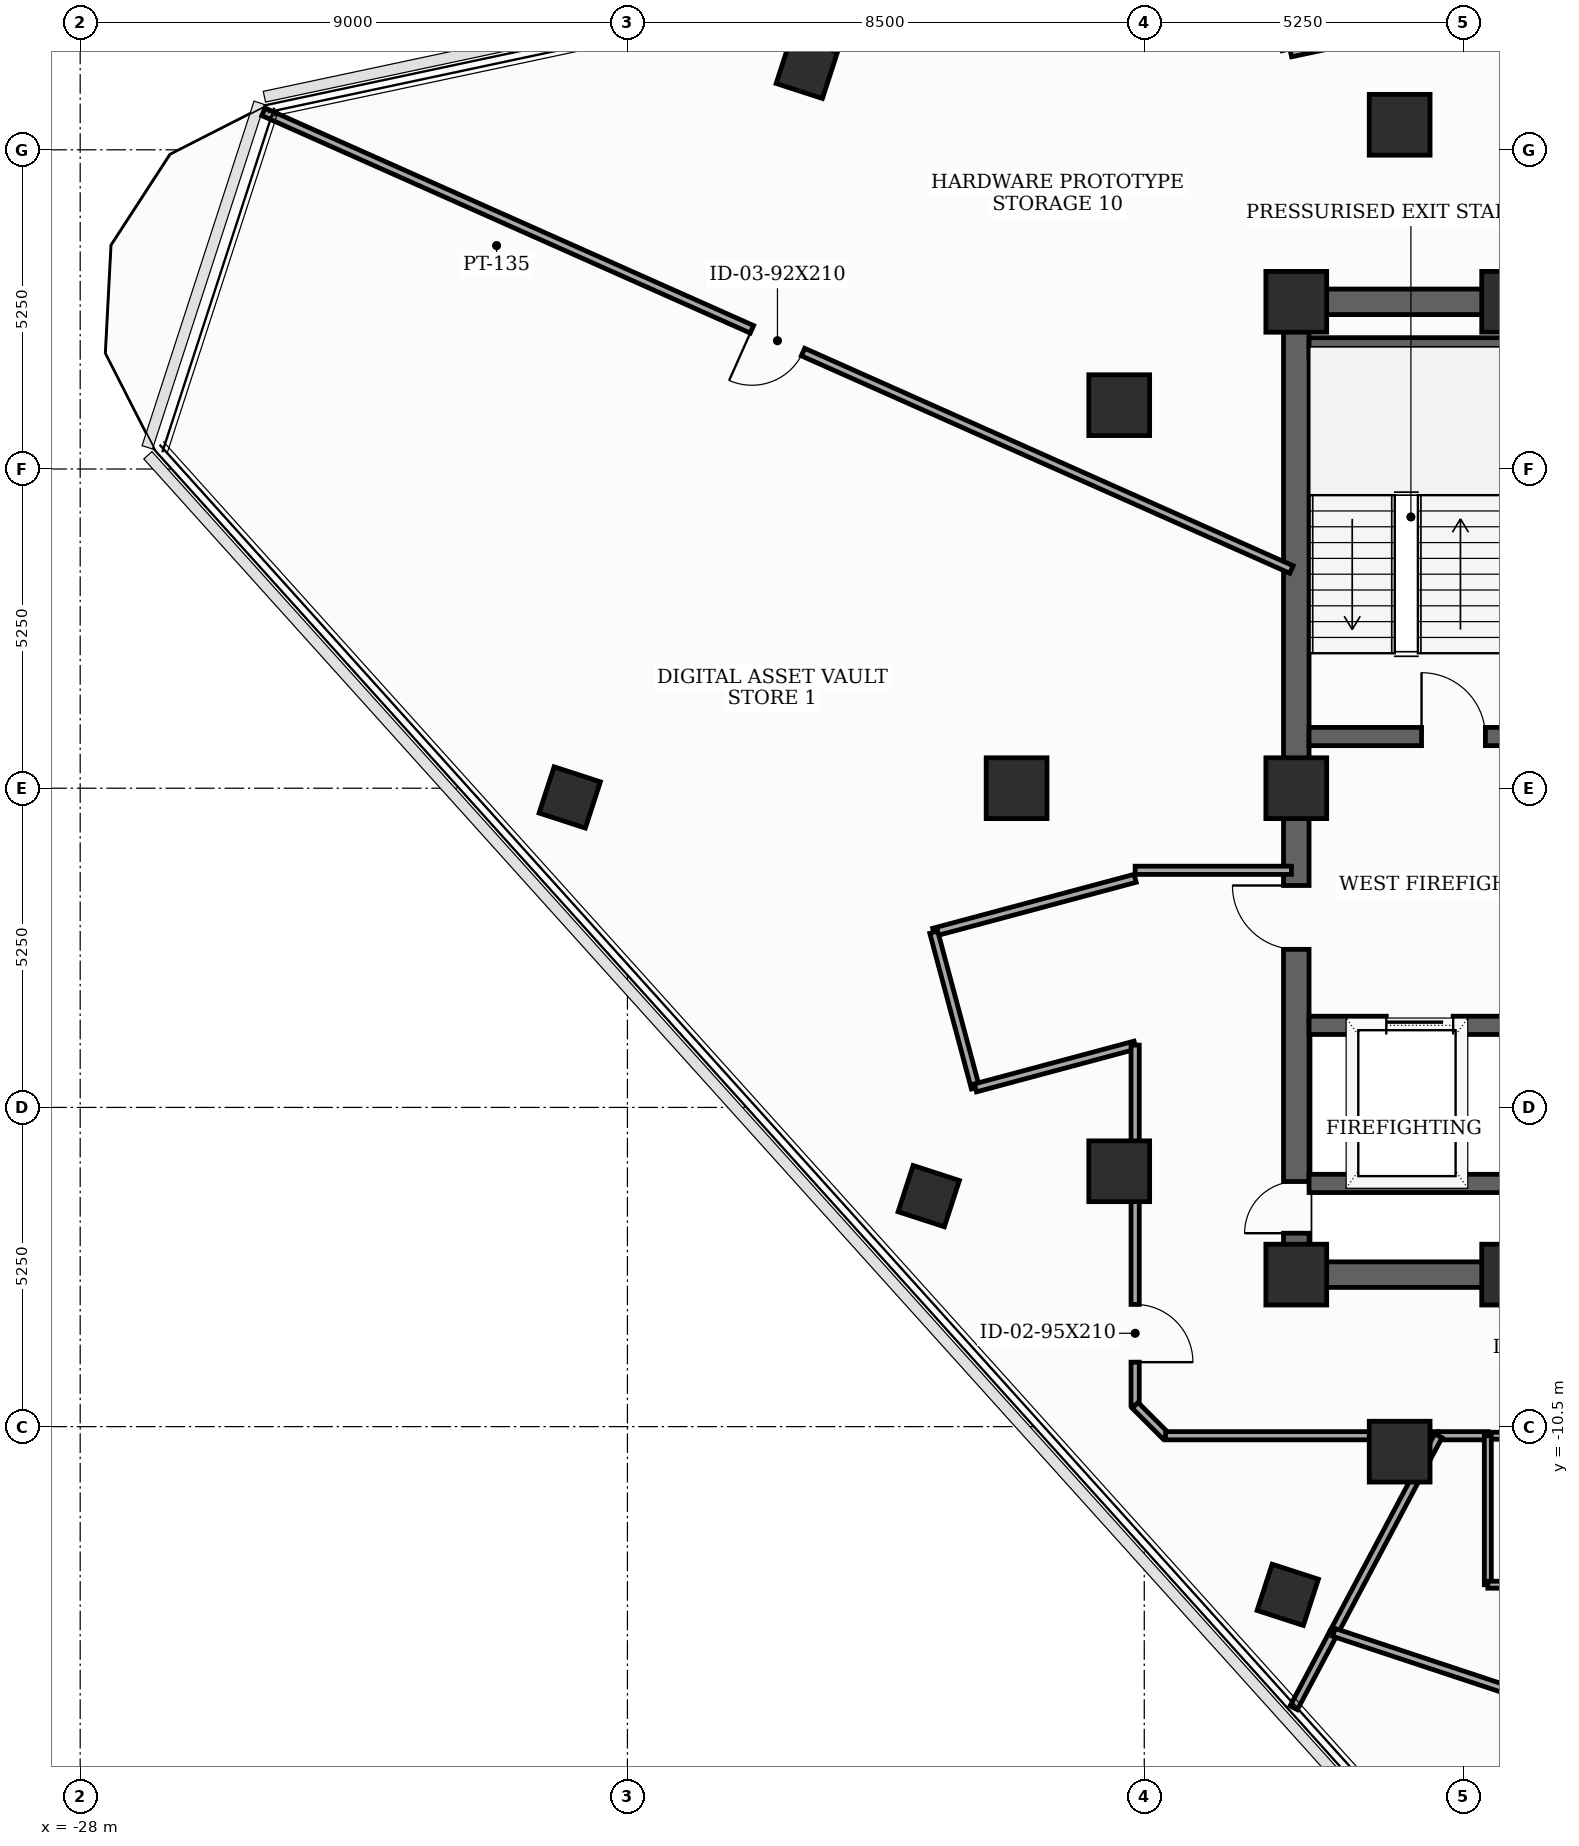
"""IFC4 building model, lengths in metres.
Left out: names, types, materials, properties, quantities, classifications, styles, units other than length and angle.
Written with IfcOpenShell. Run it as: python <this file> out.ifc"""

import sys

from ifc_helpers import new_model, si_unit, direction, frame, frame_2d, origin, origin_2d, place, context, subcontext, project, spatial, rectangle, extrude, element, fill, save


model = new_model("IFC4")
c1 = context("Model", 3, precision=1e-05, world=origin(), true_north=direction((0.0, 1.0)))
c2 = subcontext(c1, "Body", "Model", "MODEL_VIEW")
j1 = project(units=[si_unit("LENGTHUNIT", "METRE"), si_unit("PLANEANGLEUNIT", "RADIAN")], contexts=[c1])
p1 = place(None, origin())
s1 = spatial("IfcSite", under=j1, at=p1, CompositionType="ELEMENT")
p2 = place(p1, origin())
s2 = spatial("IfcBuilding", under=s1, at=p2, CompositionType="ELEMENT")
p3 = place(p2, frame((0.0, 0.0, 301.7)))
s3 = spatial("IfcBuildingStorey", under=s2, at=p3, CompositionType="ELEMENT", Elevation=301.7)
for number, where, z_axis, x_axis in (
    (1, (-8.0, -8.0, 0.0), (0.0, 0.0, 1.0), (1.0, 0.0, 0.0)),
    (2, (-4.45, -8.0, 0.0), (0.0, 0.0, 1.0), (1.0, 0.0, 0.0)),
    (3, (-4.45, 8.0, 0.0), (0.0, 0.0, 1.0), (1.0, 0.0, 0.0)),
    (4, (-8.0, 8.0, 0.0), (0.0, 0.0, 1.0), (1.0, 0.0, 0.0)),
    (5, (-8.0, 0.0, 0.0), (0.0, 0.0, 1.0), (1.0, 0.0, 0.0)),
    (6, (-6.3, 10.912, 0.0), (0.0, 0.0, 1.0), (1.0, 0.0, 0.0)),
    (7, (-10.912, 6.3, 0.0), (0.0, 0.0, 1.0), (1.0, 0.0, 0.0)),
    (8, (-12.6, 0.0, 0.0), (0.0, 0.0, 1.0), (1.0, 0.0, 0.0)),
    (9, (-10.912, -6.3, 0.0), (0.0, 0.0, 1.0), (1.0, 0.0, 0.0)),
    (10, (-6.3, -10.912, 0.0), (0.0, 0.0, 1.0), (1.0, 0.0, 0.0)),
):
    element("IfcColumn", number, at=place(p3, frame(where, z_axis=z_axis, x_axis=x_axis)), inside=s3, PredefinedType="COLUMN", context=c2, shape_type="SweptSolid", body=[
        extrude(rectangle(XDim=1.0, YDim=1.0, at=origin_2d()), origin(), (0.0, 0.0, 1.0), 3.7),
    ])
for number, where, z_axis, x_axis in (
    (11, (-16.05, 11.848, 0.0), (0.0, 0.0, 1.0), (0.309, 0.951, 0.0)),
    (12, (-19.949, -0.151, 0.0), (0.0, 0.0, 1.0), (0.309, 0.951, 0.0)),
    (13, (-14.045, -6.709, 0.0), (0.0, 0.0, 1.0), (0.309, 0.951, 0.0)),
    (14, (-8.14, -13.266, 0.0), (0.0, 0.0, 1.0), (0.309, 0.951, 0.0)),
):
    element("IfcColumn", number, at=place(p3, frame(where, z_axis=z_axis, x_axis=x_axis)), inside=s3, PredefinedType="COLUMN", context=c2, shape_type="SweptSolid", body=[
        extrude(rectangle(XDim=0.8, YDim=0.8, at=origin_2d()), origin(), (0.0, 0.0, 1.0), 3.7),
    ])
p4 = place(p3, frame((2.459, 14.402, 0.0), z_axis=(0.0, 0.0, 1.0), x_axis=(-0.978149082982, -0.207904717268, 0.0)))
e15 = element("IfcWall", 15, at=p4, inside=s3, PredefinedType="SOLIDWALL", context=c2, shape_type="SweptSolid", body=[
    extrude(rectangle(XDim=10.8, YDim=0.26, at=frame_2d((5.4, 0.0))), origin(), (0.0, 0.0, 1.0), 3.5),
])
p5 = place(p4, frame((1.6, 0.0, 0.85)))
e16 = element("IfcOpeningElement", 16, at=p5, cuts=e15, PredefinedType="OPENING", context=c2, shape_type="SweptSolid", body=[
    extrude(rectangle(XDim=2.2, YDim=1.25, at=frame_2d((1.1, 0.625))), frame((0.0, 0.14, 0.0), z_axis=(0.0, -1.0, 0.0), x_axis=(1.0, 0.0, 0.0)), (0.0, 0.0, 1.0), 0.28),
])
p6 = place(p4, frame((7.0, 0.0, 0.85)))
e17 = element("IfcOpeningElement", 17, at=p6, cuts=e15, PredefinedType="OPENING", context=c2, shape_type="SweptSolid", body=[
    extrude(rectangle(XDim=2.2, YDim=1.25, at=frame_2d((1.1, 0.625))), frame((0.0, 0.14, 0.0), z_axis=(0.0, -1.0, 0.0), x_axis=(1.0, 0.0, 0.0)), (0.0, 0.0, 1.0), 0.28),
])
p7 = place(p3, frame((-8.0, -8.0, 0.0), z_axis=(0.0, 0.0, 1.0), x_axis=(0.0, 1.0, 0.0)))
e18 = element("IfcWall", 18, at=p7, inside=s3, PredefinedType="SHEAR", context=c2, shape_type="SweptSolid", body=[
    extrude(rectangle(XDim=16.0, YDim=0.42, at=frame_2d((8.0, 0.0))), origin(), (0.0, 0.0, 1.0), 3.5),
])
p8 = place(p7, frame((0.681, 0.0, 0.0)))
e19 = element("IfcOpeningElement", 19, at=p8, cuts=e18, PredefinedType="OPENING", context=c2, shape_type="SweptSolid", body=[
    extrude(rectangle(XDim=0.85, YDim=2.02, at=frame_2d((0.425, 1.01))), frame((0.0, 0.22, 0.0), z_axis=(0.0, -1.0, 0.0), x_axis=(1.0, 0.0, 0.0)), (0.0, 0.0, 1.0), 0.44),
])
p9 = place(p7, frame((5.35, 0.0, 0.0)))
e20 = element("IfcOpeningElement", 20, at=p9, cuts=e18, PredefinedType="OPENING", context=c2, shape_type="SweptSolid", body=[
    extrude(rectangle(XDim=1.05, YDim=2.15, at=frame_2d((0.525, 1.075))), frame((0.0, 0.22, 0.0), z_axis=(0.0, -1.0, 0.0), x_axis=(1.0, 0.0, 0.0)), (0.0, 0.0, 1.0), 0.44),
])
p10 = place(p3, frame((-8.0, -8.0, 0.0), z_axis=(0.0, 0.0, 1.0), x_axis=(1.0, 0.0, 0.0)))
e21 = element("IfcWall", 21, at=p10, inside=s3, PredefinedType="SHEAR", context=c2, shape_type="SweptSolid", body=[
    extrude(rectangle(XDim=16.0, YDim=0.42, at=frame_2d((8.0, 0.0))), origin(), (0.0, 0.0, 1.0), 3.5),
])
p11 = place(p10, frame((4.6, 0.0, 0.0)))
e22 = element("IfcOpeningElement", 22, at=p11, cuts=e21, PredefinedType="OPENING", context=c2, shape_type="SweptSolid", body=[
    extrude(rectangle(XDim=0.95, YDim=2.1, at=frame_2d((0.475, 1.05))), frame((0.0, 0.22, 0.0), z_axis=(0.0, -1.0, 0.0), x_axis=(1.0, 0.0, 0.0)), (0.0, 0.0, 1.0), 0.44),
])
p12 = place(p10, frame((7.52, 0.0, 0.0)))
e23 = element("IfcOpeningElement", 23, at=p12, cuts=e21, PredefinedType="OPENING", context=c2, shape_type="SweptSolid", body=[
    extrude(rectangle(XDim=0.95, YDim=2.1, at=frame_2d((0.475, 1.05))), frame((0.0, 0.22, 0.0), z_axis=(0.0, -1.0, 0.0), x_axis=(1.0, 0.0, 0.0)), (0.0, 0.0, 1.0), 0.44),
])
p13 = place(p10, frame((10.45, 0.0, 0.0)))
e24 = element("IfcOpeningElement", 24, at=p13, cuts=e21, PredefinedType="OPENING", context=c2, shape_type="SweptSolid", body=[
    extrude(rectangle(XDim=0.95, YDim=2.1, at=frame_2d((0.475, 1.05))), frame((0.0, 0.22, 0.0), z_axis=(0.0, -1.0, 0.0), x_axis=(1.0, 0.0, 0.0)), (0.0, 0.0, 1.0), 0.44),
])
p14 = place(p3, frame((-8.0, 8.0, 0.0), z_axis=(0.0, 0.0, 1.0), x_axis=(1.0, 0.0, 0.0)))
e25 = element("IfcWall", 25, at=p14, inside=s3, PredefinedType="SHEAR", context=c2, shape_type="SweptSolid", body=[
    extrude(rectangle(XDim=16.0, YDim=0.42, at=frame_2d((8.0, 0.0))), origin(), (0.0, 0.0, 1.0), 3.5),
])
p15 = place(p14, frame((7.1, 0.0, 0.0)))
e26 = element("IfcOpeningElement", 26, at=p15, cuts=e25, PredefinedType="OPENING", context=c2, shape_type="SweptSolid", body=[
    extrude(rectangle(XDim=1.8, YDim=2.15, at=frame_2d((0.9, 1.075))), frame((0.0, 0.22, 0.0), z_axis=(0.0, -1.0, 0.0), x_axis=(1.0, 0.0, 0.0)), (0.0, 0.0, 1.0), 0.44),
])
p16 = place(p3, frame((-7.79, 0.85, 0.0), z_axis=(0.0, 0.0, 1.0), x_axis=(1.0, 0.0, 0.0)))
e27 = element("IfcWall", 27, at=p16, inside=s3, PredefinedType="SHEAR", context=c2, shape_type="SweptSolid", body=[
    extrude(rectangle(XDim=3.34, YDim=0.3, at=frame_2d((1.67, 0.0))), origin(), (0.0, 0.0, 1.0), 3.5),
])
p17 = place(p16, frame((1.85, 0.0, 0.0)))
e28 = element("IfcOpeningElement", 28, at=p17, cuts=e27, PredefinedType="OPENING", context=c2, shape_type="SweptSolid", body=[
    extrude(rectangle(XDim=1.05, YDim=2.15, at=frame_2d((0.525, 1.075))), frame((0.0, 0.16, 0.0), z_axis=(0.0, -1.0, 0.0), x_axis=(1.0, 0.0, 0.0)), (0.0, 0.0, 1.0), 0.32),
])
p18 = place(p3, frame((-7.79, 7.26, 0.0), z_axis=(0.0, 0.0, 1.0), x_axis=(1.0, 0.0, 0.0)))
e29 = element("IfcWall", 29, at=p18, inside=s3, PredefinedType="SHEAR", context=c2, shape_type="SweptSolid", body=[
    extrude(rectangle(XDim=3.34, YDim=0.3, at=frame_2d((1.67, 0.0))), origin(), (0.0, 0.0, 1.0), 3.5),
])
p19 = place(p3, frame((-7.79, -3.9, 0.0), z_axis=(0.0, 0.0, 1.0), x_axis=(1.0, 0.0, 0.0)))
e30 = element("IfcWall", 30, at=p19, inside=s3, PredefinedType="SHEAR", context=c2, shape_type="SweptSolid", body=[
    extrude(rectangle(XDim=3.34, YDim=0.3, at=frame_2d((1.67, 0.0))), origin(), (0.0, 0.0, 1.0), 3.5),
])
p20 = place(p19, frame((1.27, 0.0, 0.0)))
e31 = element("IfcOpeningElement", 31, at=p20, cuts=e30, PredefinedType="OPENING", context=c2, shape_type="SweptSolid", body=[
    extrude(rectangle(XDim=1.1, YDim=2.1, at=frame_2d((0.55, 1.05))), frame((0.0, 0.16, 0.0), z_axis=(0.0, -1.0, 0.0), x_axis=(1.0, 0.0, 0.0)), (0.0, 0.0, 1.0), 0.32),
])
p21 = place(p3, frame((-7.79, -6.5, 0.0), z_axis=(0.0, 0.0, 1.0), x_axis=(1.0, 0.0, 0.0)))
e32 = element("IfcWall", 32, at=p21, inside=s3, PredefinedType="SHEAR", context=c2, shape_type="SweptSolid", body=[
    extrude(rectangle(XDim=3.34, YDim=0.3, at=frame_2d((1.67, 0.0))), origin(), (0.0, 0.0, 1.0), 3.5),
])
p22 = place(p3, frame((-8.08, -1.35, 0.0), z_axis=(0.0, 0.0, 1.0), x_axis=(-1.0, 0.0, 0.0)))
e33 = element("IfcWall", 33, at=p22, inside=s3, PredefinedType="PARTITIONING", context=c2, shape_type="SweptSolid", body=[
    extrude(rectangle(XDim=2.57, YDim=0.135, at=frame_2d((1.285, 0.0))), origin(), (0.0, 0.0, 1.0), 2.885),
])
p23 = place(p3, frame((-10.65, -1.482, 0.0), z_axis=(0.0, 0.0, 1.0), x_axis=(-0.965961397105, -0.2586862565, 0.0)))
e34 = element("IfcWall", 34, at=p23, inside=s3, PredefinedType="PARTITIONING", context=c2, shape_type="SweptSolid", body=[
    extrude(rectangle(XDim=3.429, YDim=0.135, at=frame_2d((1.714, 0.0))), origin(), (0.0, 0.0, 1.0), 2.885),
])
p24 = place(p3, frame((-13.962, -2.369, 0.0), z_axis=(0.0, 0.0, 1.0), x_axis=(0.258413725385, -0.966034340245, 0.0)))
e35 = element("IfcWall", 35, at=p24, inside=s3, PredefinedType="PARTITIONING", context=c2, shape_type="SweptSolid", body=[
    extrude(rectangle(XDim=2.65, YDim=0.135, at=frame_2d((1.325, 0.0))), origin(), (0.0, 0.0, 1.0), 3.5),
])
p25 = place(p3, frame((-13.277, -4.929, 0.0), z_axis=(0.0, 0.0, 1.0), x_axis=(0.965934830229, 0.258785439601, 0.0)))
e36 = element("IfcWall", 36, at=p25, inside=s3, PredefinedType="PARTITIONING", context=c2, shape_type="SweptSolid", body=[
    extrude(rectangle(XDim=2.72, YDim=0.135, at=frame_2d((1.36, 0.0))), origin(), (0.0, 0.0, 1.0), 2.885),
])
p26 = place(p3, frame((-10.65, -4.225, 0.0), z_axis=(0.0, 0.0, 1.0), x_axis=(0.0, -1.0, 0.0)))
e37 = element("IfcWall", 37, at=p26, inside=s3, PredefinedType="PARTITIONING", context=c2, shape_type="SweptSolid", body=[
    extrude(rectangle(XDim=5.925, YDim=0.135, at=frame_2d((2.962, 0.0))), origin(), (0.0, 0.0, 1.0), 2.885),
])
p27 = place(p26, frame((4.265, 0.0, 0.0)))
e38 = element("IfcOpeningElement", 38, at=p27, cuts=e37, PredefinedType="OPENING", context=c2, shape_type="SweptSolid", body=[
    extrude(rectangle(XDim=0.95, YDim=2.1, at=frame_2d((0.475, 1.05))), frame((0.0, 0.077, 0.0), z_axis=(0.0, -1.0, 0.0), x_axis=(1.0, 0.0, 0.0)), (0.0, 0.0, 1.0), 0.155),
])
p28 = place(p3, frame((-10.65, -10.15, 0.0), z_axis=(0.0, 0.0, 1.0), x_axis=(0.707106781187, -0.707106781187, 0.0)))
e39 = element("IfcWall", 39, at=p28, inside=s3, PredefinedType="PARTITIONING", context=c2, shape_type="SweptSolid", body=[
    extrude(rectangle(XDim=0.707, YDim=0.135, at=frame_2d((0.354, 0.0))), origin(), (0.0, 0.0, 1.0), 3.035),
])
p29 = place(p3, frame((-10.15, -10.65, 0.0), z_axis=(0.0, 0.0, 1.0), x_axis=(1.0, 0.0, 0.0)))
e40 = element("IfcWall", 40, at=p29, inside=s3, PredefinedType="PARTITIONING", context=c2, shape_type="SweptSolid", body=[
    extrude(rectangle(XDim=4.487, YDim=0.135, at=frame_2d((2.243, 0.0))), origin(), (0.0, 0.0, 1.0), 2.885),
])
p30 = place(p3, frame((-4.85, -10.65, 0.0), z_axis=(0.0, 0.0, 1.0), x_axis=(1.0, 0.0, 0.0)))
e41 = element("IfcWall", 41, at=p30, inside=s3, PredefinedType="PARTITIONING", context=c2, shape_type="SweptSolid", body=[
    extrude(rectangle(XDim=2.4, YDim=0.115, at=frame_2d((1.2, 0.0))), origin(), (0.0, 0.0, 1.0), 3.5),
])
p31 = place(p30, frame((0.74, 0.0, 0.0)))
e42 = element("IfcOpeningElement", 42, at=p31, cuts=e41, PredefinedType="OPENING", context=c2, shape_type="SweptSolid", body=[
    extrude(rectangle(XDim=0.92, YDim=2.1, at=frame_2d((0.46, 1.05))), frame((0.0, 0.067, 0.0), z_axis=(0.0, -1.0, 0.0), x_axis=(1.0, 0.0, 0.0)), (0.0, 0.0, 1.0), 0.135),
])
p32 = place(p3, frame((-5.663, -10.65, 0.0), z_axis=(0.0, 0.0, 1.0), x_axis=(1.0, 0.0, 0.0)))
e43 = element("IfcWall", 43, at=p32, inside=s3, PredefinedType="PARTITIONING", context=c2, shape_type="SweptSolid", body=[
    extrude(rectangle(XDim=0.813, YDim=0.135, at=frame_2d((0.406, 0.0))), origin(), (0.0, 0.0, 1.0), 3.5),
])
p33 = place(p3, frame((-7.382, -13.884, 0.0), z_axis=(0.0, 0.0, 1.0), x_axis=(0.469338791783, 0.88301817565, 0.0)))
e44 = element("IfcWall", 44, at=p33, inside=s3, PredefinedType="PARTITIONING", context=c2, shape_type="SweptSolid", body=[
    extrude(rectangle(XDim=3.663, YDim=0.135, at=frame_2d((1.831, 0.0))), origin(), (0.0, 0.0, 1.0), 2.885),
])
p34 = place(p3, frame((-8.042, -15.124, 0.0), z_axis=(0.0, 0.0, 1.0), x_axis=(0.469595679185, 0.882881587808, 0.0)))
e45 = element("IfcWall", 45, at=p34, inside=s3, PredefinedType="PARTITIONING", context=c2, shape_type="SweptSolid", body=[
    extrude(rectangle(XDim=1.405, YDim=0.135, at=frame_2d((0.702, 0.0))), origin(), (0.0, 0.0, 1.0), 3.035),
])
p35 = place(p3, frame((-8.08, 3.597, 0.0), z_axis=(0.0, 0.0, 1.0), x_axis=(-0.913542590258, 0.406743083266, 0.0)))
e46 = element("IfcWall", 46, at=p35, inside=s3, PredefinedType="PARTITIONING", context=c2, shape_type="SweptSolid", body=[
    extrude(rectangle(XDim=18.505, YDim=0.135, at=frame_2d((9.252, 0.0))), origin(), (0.0, 0.0, 1.0), 2.885),
])
p36 = place(p35, frame((8.792, 0.0, 0.0)))
e47 = element("IfcOpeningElement", 47, at=p36, cuts=e46, PredefinedType="OPENING", context=c2, shape_type="SweptSolid", body=[
    extrude(rectangle(XDim=0.92, YDim=2.1, at=frame_2d((0.46, 1.05))), frame((0.0, 0.077, 0.0), z_axis=(0.0, -1.0, 0.0), x_axis=(1.0, 0.0, 0.0)), (0.0, 0.0, 1.0), 0.155),
])
p37 = place(p3, frame((-4.85, -10.65, 0.0), z_axis=(0.0, 0.0, 1.0), x_axis=(0.0, -1.0, 0.0)))
e48 = element("IfcWall", 48, at=p37, inside=s3, PredefinedType="PARTITIONING", context=c2, shape_type="SweptSolid", body=[
    extrude(rectangle(XDim=2.45, YDim=0.115, at=frame_2d((1.225, 0.0))), origin(), (0.0, 0.0, 1.0), 2.885),
])
p38 = place(p3, frame((-4.85, -13.1, 0.0), z_axis=(0.0, 0.0, 1.0), x_axis=(1.0, 0.0, 0.0)))
e49 = element("IfcWall", 49, at=p38, inside=s3, PredefinedType="PARTITIONING", context=c2, shape_type="SweptSolid", body=[
    extrude(rectangle(XDim=2.4, YDim=0.115, at=frame_2d((1.2, 0.0))), origin(), (0.0, 0.0, 1.0), 3.5),
])
p39 = place(p3, frame((-7.382, -13.884, 0.0), z_axis=(0.0, 0.0, 1.0), x_axis=(0.949247116003, -0.314531258795, 0.0)))
e50 = element("IfcWall", 50, at=p39, inside=s3, PredefinedType="PARTITIONING", context=c2, shape_type="SweptSolid", body=[
    extrude(rectangle(XDim=5.7, YDim=0.135, at=frame_2d((2.85, 0.0))), origin(), (0.0, 0.0, 1.0), 3.035),
])
p40 = place(p8, origin())
e51 = element("IfcDoor", 51, at=p40, inside=s3, OperationType="SINGLE_SWING_LEFT", PredefinedType="TRAPDOOR", context=c2, shape_type="SweptSolid", body=[
    extrude(rectangle(XDim=0.85, YDim=2.02, at=frame_2d((0.425, 1.01))), frame((0.0, 0.025, 0.0), z_axis=(0.0, -1.0, 0.0), x_axis=(1.0, 0.0, 0.0)), (0.0, 0.0, 1.0), 0.05),
])
fill(e19, e51)
p41 = place(p9, origin())
e52 = element("IfcDoor", 52, at=p41, inside=s3, OperationType="SINGLE_SWING_RIGHT", PredefinedType="DOOR", context=c2, shape_type="SweptSolid", body=[
    extrude(rectangle(XDim=1.05, YDim=2.15, at=frame_2d((0.525, 1.075))), frame((0.0, 0.025, 0.0), z_axis=(0.0, -1.0, 0.0), x_axis=(1.0, 0.0, 0.0)), (0.0, 0.0, 1.0), 0.05),
])
fill(e20, e52)
p42 = place(p17, origin())
e53 = element("IfcDoor", 53, at=p42, inside=s3, OperationType="SINGLE_SWING_LEFT", PredefinedType="DOOR", context=c2, shape_type="SweptSolid", body=[
    extrude(rectangle(XDim=1.05, YDim=2.15, at=frame_2d((0.525, 1.075))), frame((0.0, 0.025, 0.0), z_axis=(0.0, -1.0, 0.0), x_axis=(1.0, 0.0, 0.0)), (0.0, 0.0, 1.0), 0.05),
])
fill(e28, e53)
p43 = place(p20, origin())
e54 = element("IfcDoor", 54, at=p43, inside=s3, OperationType="SLIDING_TO_LEFT", PredefinedType="DOOR", context=c2, shape_type="SweptSolid", body=[
    extrude(rectangle(XDim=1.1, YDim=2.1, at=frame_2d((0.55, 1.05))), frame((0.0, 0.025, 0.0), z_axis=(0.0, -1.0, 0.0), x_axis=(1.0, 0.0, 0.0)), (0.0, 0.0, 1.0), 0.05),
])
fill(e31, e54)
p44 = place(p27, origin())
e55 = element("IfcDoor", 55, at=p44, inside=s3, OperationType="SINGLE_SWING_RIGHT", PredefinedType="DOOR", context=c2, shape_type="SweptSolid", body=[
    extrude(rectangle(XDim=0.95, YDim=2.1, at=frame_2d((0.475, 1.05))), frame((0.0, 0.025, 0.0), z_axis=(0.0, -1.0, 0.0), x_axis=(1.0, 0.0, 0.0)), (0.0, 0.0, 1.0), 0.05),
])
fill(e38, e55)
p45 = place(p36, origin())
e56 = element("IfcDoor", 56, at=p45, inside=s3, OperationType="SINGLE_SWING_RIGHT", PredefinedType="DOOR", context=c2, shape_type="SweptSolid", body=[
    extrude(rectangle(XDim=0.92, YDim=2.1, at=frame_2d((0.46, 1.05))), frame((0.0, 0.025, 0.0), z_axis=(0.0, -1.0, 0.0), x_axis=(1.0, 0.0, 0.0)), (0.0, 0.0, 1.0), 0.05),
])
fill(e47, e56)
save(model, sys.argv[1])
